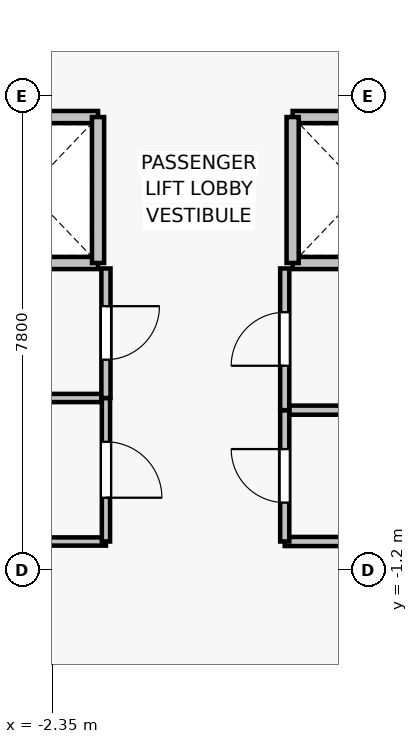
"""IFC4 building model, lengths in metres.
Left out: names, types, materials, properties, quantities, classifications, styles, units other than length and angle.
Written with IfcOpenShell. Run it as: python <this file> out.ifc"""

import sys

from ifc_helpers import new_model, si_unit, direction, frame, frame_2d, origin, place, context, subcontext, project, spatial, rectangle, extrude, source, transform, mapped, element, fill, save


model = new_model("IFC4")
c1 = context("Model", 3, precision=1e-05, world=origin(), true_north=direction((0.0, 1.0)))
c2 = subcontext(c1, "Body", "Model", "MODEL_VIEW")
j1 = project(units=[si_unit("LENGTHUNIT", "METRE"), si_unit("PLANEANGLEUNIT", "RADIAN")], contexts=[c1])
p1 = place(None, origin())
s1 = spatial("IfcSite", under=j1, at=p1, CompositionType="ELEMENT")
p2 = place(p1, origin())
s2 = spatial("IfcBuilding", under=s1, at=p2, CompositionType="ELEMENT")
p3 = place(p2, frame((0.0, 0.0, 67.0)))
s3 = spatial("IfcBuildingStorey", under=s2, at=p3, CompositionType="ELEMENT", Elevation=67.0)
for number, where, z_axis, x_axis in (
    (1, (-1.6, 3.85, 0.0), (0.0, 0.0, 1.0), (-1.0, 0.0, 0.0)),
    (2, (-3.9, 6.25, 0.0), (0.0, 0.0, 1.0), (1.0, 0.0, 0.0)),
):
    element("IfcWall", number, at=place(p3, frame(where, z_axis=z_axis, x_axis=x_axis)), inside=s3, PredefinedType="SOLIDWALL", context=c2, shape_type="SweptSolid", body=[
        extrude(rectangle(XDim=2.3, YDim=0.2, at=frame_2d((1.15, 0.0))), origin(), (0.0, 0.0, 1.0), 3.075),
    ])
p4 = place(p3, frame((-1.6, 6.25, 0.0), z_axis=(0.0, 0.0, 1.0), x_axis=(0.0, -1.0, 0.0)))
e3 = element("IfcWall", 3, at=p4, inside=s3, PredefinedType="SOLIDWALL", context=c2, shape_type="SweptSolid", body=[
    extrude(rectangle(XDim=2.4, YDim=0.2, at=frame_2d((1.2, 0.0))), origin(), (0.0, 0.0, 1.0), 3.075),
])
for number, where, z_axis, x_axis in (
    (4, (3.9, 3.85, 0.0), (0.0, 0.0, 1.0), (-1.0, 0.0, 0.0)),
    (5, (1.6, 6.25, 0.0), (0.0, 0.0, 1.0), (1.0, 0.0, 0.0)),
):
    element("IfcWall", number, at=place(p3, frame(where, z_axis=z_axis, x_axis=x_axis)), inside=s3, PredefinedType="SOLIDWALL", context=c2, shape_type="SweptSolid", body=[
        extrude(rectangle(XDim=2.3, YDim=0.2, at=frame_2d((1.15, 0.0))), origin(), (0.0, 0.0, 1.0), 3.075),
    ])
p5 = place(p3, frame((1.6, 3.85, 0.0), z_axis=(0.0, 0.0, 1.0), x_axis=(0.0, 1.0, 0.0)))
e6 = element("IfcWall", 6, at=p5, inside=s3, PredefinedType="SOLIDWALL", context=c2, shape_type="SweptSolid", body=[
    extrude(rectangle(XDim=2.4, YDim=0.2, at=frame_2d((1.2, 0.0))), origin(), (0.0, 0.0, 1.0), 3.075),
])
for number, where, z_axis, x_axis in (
    (7, (-1.47, -0.73, 0.0), (0.0, 0.0, 1.0), (-1.0, 0.0, 0.0)),
    (8, (-3.47, 1.63, 0.0), (0.0, 0.0, 1.0), (1.0, 0.0, 0.0)),
):
    element("IfcWall", number, at=place(p3, frame(where, z_axis=z_axis, x_axis=x_axis)), inside=s3, PredefinedType="PARTITIONING", context=c2, shape_type="SweptSolid", body=[
        extrude(rectangle(XDim=2.0, YDim=0.135, at=frame_2d((1.0, 0.0))), origin(), (0.0, 0.0, 1.0), 3.075),
    ])
p6 = place(p3, frame((-1.47, 1.63, 0.0), z_axis=(0.0, 0.0, 1.0), x_axis=(0.0, -1.0, 0.0)))
e9 = element("IfcWall", 9, at=p6, inside=s3, PredefinedType="PARTITIONING", context=c2, shape_type="SweptSolid", body=[
    extrude(rectangle(XDim=2.36, YDim=0.135, at=frame_2d((1.18, 0.0))), origin(), (0.0, 0.0, 1.0), 3.075),
])
p7 = place(p6, frame((0.72, 0.0, 0.0)))
e10 = element("IfcOpeningElement", 10, at=p7, cuts=e9, PredefinedType="OPENING", context=c2, shape_type="SweptSolid", body=[
    extrude(rectangle(XDim=0.92, YDim=2.1, at=frame_2d((0.46, 1.05))), frame((0.0, 0.077, 0.0), z_axis=(0.0, -1.0, 0.0), x_axis=(1.0, 0.0, 0.0)), (0.0, 0.0, 1.0), 0.155),
])
p8 = place(p3, frame((-1.47, 3.76, 0.0), z_axis=(0.0, 0.0, 1.0), x_axis=(0.0, -1.0, 0.0)))
e11 = element("IfcWall", 11, at=p8, inside=s3, PredefinedType="PARTITIONING", context=c2, shape_type="SweptSolid", body=[
    extrude(rectangle(XDim=2.13, YDim=0.15, at=frame_2d((1.065, 0.0))), origin(), (0.0, 0.0, 1.0), 3.075),
])
p9 = place(p8, frame((0.62, 0.0, 0.0)))
e12 = element("IfcOpeningElement", 12, at=p9, cuts=e11, PredefinedType="OPENING", context=c2, shape_type="SweptSolid", body=[
    extrude(rectangle(XDim=0.88, YDim=2.1, at=frame_2d((0.44, 1.05))), frame((0.0, 0.085, 0.0), z_axis=(0.0, -1.0, 0.0), x_axis=(1.0, 0.0, 0.0)), (0.0, 0.0, 1.0), 0.17),
])
for number, where, z_axis, x_axis in (
    (13, (3.68, -0.73, 0.0), (0.0, 0.0, 1.0), (-1.0, 0.0, 0.0)),
    (14, (1.47, 1.43, 0.0), (0.0, 0.0, 1.0), (1.0, 0.0, 0.0)),
):
    element("IfcWall", number, at=place(p3, frame(where, z_axis=z_axis, x_axis=x_axis)), inside=s3, PredefinedType="PARTITIONING", context=c2, shape_type="SweptSolid", body=[
        extrude(rectangle(XDim=2.21, YDim=0.15, at=frame_2d((1.105, 0.0))), origin(), (0.0, 0.0, 1.0), 3.075),
    ])
p10 = place(p3, frame((1.47, -0.73, 0.0), z_axis=(0.0, 0.0, 1.0), x_axis=(0.0, 1.0, 0.0)))
e15 = element("IfcWall", 15, at=p10, inside=s3, PredefinedType="PARTITIONING", context=c2, shape_type="SweptSolid", body=[
    extrude(rectangle(XDim=2.16, YDim=0.15, at=frame_2d((1.08, 0.0))), origin(), (0.0, 0.0, 1.0), 3.075),
])
p11 = place(p10, frame((0.64, 0.0, 0.0)))
e16 = element("IfcOpeningElement", 16, at=p11, cuts=e15, PredefinedType="OPENING", context=c2, shape_type="SweptSolid", body=[
    extrude(rectangle(XDim=0.88, YDim=2.1, at=frame_2d((0.44, 1.05))), frame((0.0, 0.085, 0.0), z_axis=(0.0, -1.0, 0.0), x_axis=(1.0, 0.0, 0.0)), (0.0, 0.0, 1.0), 0.17),
])
p12 = place(p3, frame((1.47, 1.43, 0.0), z_axis=(0.0, 0.0, 1.0), x_axis=(0.0, 1.0, 0.0)))
e17 = element("IfcWall", 17, at=p12, inside=s3, PredefinedType="PARTITIONING", context=c2, shape_type="SweptSolid", body=[
    extrude(rectangle(XDim=2.33, YDim=0.15, at=frame_2d((1.165, 0.0))), origin(), (0.0, 0.0, 1.0), 3.075),
])
p13 = place(p12, frame((0.73, 0.0, 0.0)))
e18 = element("IfcOpeningElement", 18, at=p13, cuts=e17, PredefinedType="OPENING", context=c2, shape_type="SweptSolid", body=[
    extrude(rectangle(XDim=0.88, YDim=2.15, at=frame_2d((0.44, 1.075))), frame((0.0, 0.085, 0.0), z_axis=(0.0, -1.0, 0.0), x_axis=(1.0, 0.0, 0.0)), (0.0, 0.0, 1.0), 0.17),
])
m1 = source(origin(), c2, "Body", "SweptSolid", [
    extrude(rectangle(XDim=0.92, YDim=2.1, at=frame_2d((0.46, 1.05))), frame((0.0, 0.025, 0.0), z_axis=(0.0, -1.0, 0.0), x_axis=(1.0, 0.0, 0.0)), (0.0, 0.0, 1.0), 0.05),
])
p14 = place(p7, origin())
e19 = element("IfcDoor", 19, at=p14, inside=s3, OperationType="SINGLE_SWING_RIGHT", PredefinedType="DOOR", context=c2, shape_type="MappedRepresentation", body=[
    mapped(m1, transform((0.0, 0.0, 0.0), x_axis=(1.0, 0.0, 0.0), y_axis=(0.0, 1.0, 0.0), z_axis=(0.0, 0.0, 1.0), scale=1.0)),
])
fill(e10, e19)
m2 = source(origin(), c2, "Body", "SweptSolid", [
    extrude(rectangle(XDim=0.88, YDim=2.1, at=frame_2d((0.44, 1.05))), frame((0.0, 0.025, 0.0), z_axis=(0.0, -1.0, 0.0), x_axis=(1.0, 0.0, 0.0)), (0.0, 0.0, 1.0), 0.05),
])
p15 = place(p9, origin())
e20 = element("IfcDoor", 20, at=p15, inside=s3, OperationType="SINGLE_SWING_LEFT", PredefinedType="DOOR", context=c2, shape_type="MappedRepresentation", body=[
    mapped(m2, transform((0.0, 0.0, 0.0), x_axis=(1.0, 0.0, 0.0), y_axis=(0.0, 1.0, 0.0), z_axis=(0.0, 0.0, 1.0), scale=1.0)),
])
fill(e12, e20)
p16 = place(p11, origin())
e21 = element("IfcDoor", 21, at=p16, inside=s3, OperationType="SINGLE_SWING_RIGHT", PredefinedType="DOOR", context=c2, shape_type="MappedRepresentation", body=[
    mapped(m2, transform((0.0, 0.0, 0.0), x_axis=(1.0, 0.0, 0.0), y_axis=(0.0, 1.0, 0.0), z_axis=(0.0, 0.0, 1.0), scale=1.0)),
])
fill(e16, e21)
m3 = source(origin(), c2, "Body", "SweptSolid", [
    extrude(rectangle(XDim=0.88, YDim=2.15, at=frame_2d((0.44, 1.075))), frame((0.0, 0.025, 0.0), z_axis=(0.0, -1.0, 0.0), x_axis=(1.0, 0.0, 0.0)), (0.0, 0.0, 1.0), 0.05),
])
p17 = place(p13, origin())
e22 = element("IfcDoor", 22, at=p17, inside=s3, OperationType="SINGLE_SWING_LEFT", PredefinedType="DOOR", context=c2, shape_type="MappedRepresentation", body=[
    mapped(m3, transform((0.0, 0.0, 0.0), x_axis=(1.0, 0.0, 0.0), y_axis=(0.0, 1.0, 0.0), z_axis=(0.0, 0.0, 1.0), scale=1.0)),
])
fill(e18, e22)
save(model, sys.argv[1])
